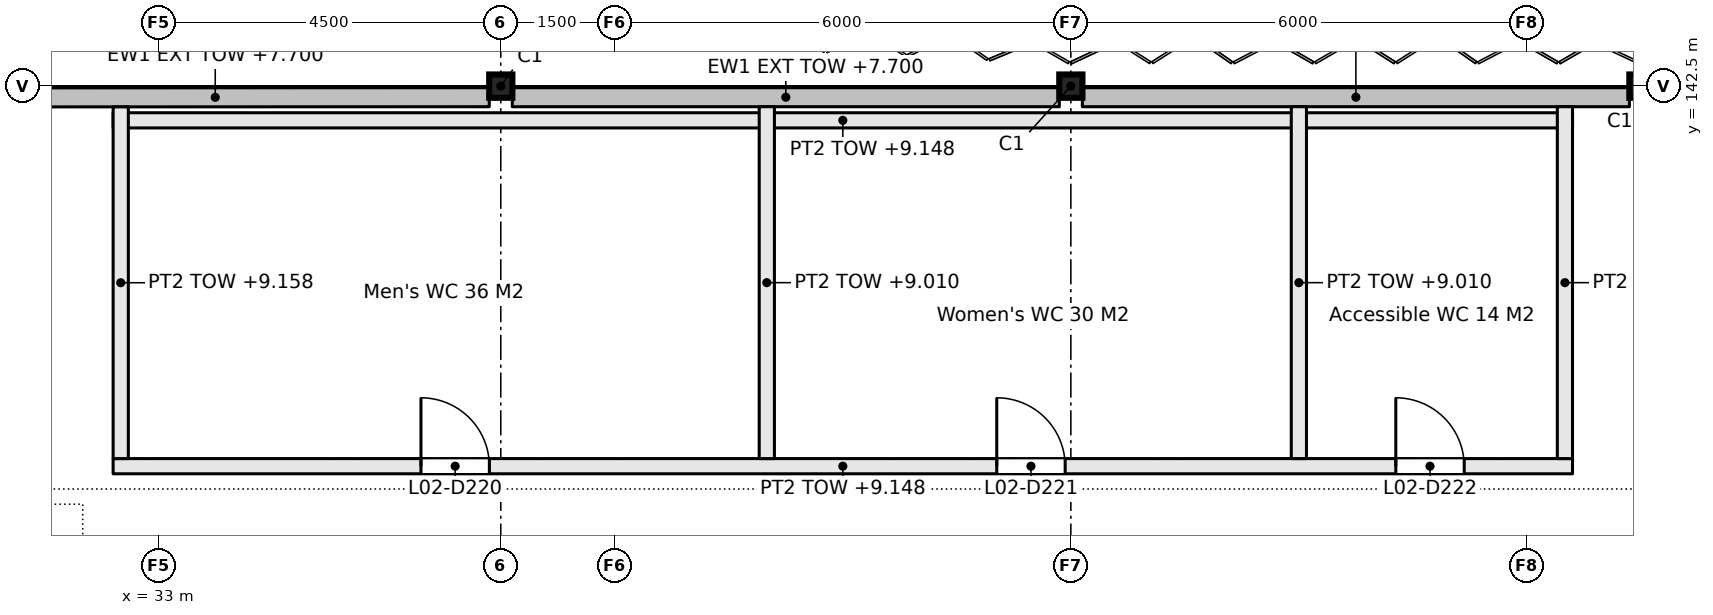
"""IFC4 building model, lengths in metres.
Left out: names, types, materials, properties, quantities, classifications, styles, units other than length and angle.
Written with IfcOpenShell. Run it as: python <this file> out.ifc"""

import sys

from ifc_helpers import new_model, si_unit, direction, frame, frame_2d, origin, origin_2d, place, context, subcontext, project, spatial, rectangle, i_section, extrude, element, fill, save


model = new_model("IFC4")
c1 = context("Model", 3, precision=1e-05, world=origin(), true_north=direction((0.0, 1.0)))
c2 = subcontext(c1, "Body", "Model", "MODEL_VIEW")
j1 = project(units=[si_unit("LENGTHUNIT", "METRE"), si_unit("PLANEANGLEUNIT", "RADIAN")], contexts=[c1])
p1 = place(None, origin())
s1 = spatial("IfcSite", under=j1, at=p1, CompositionType="ELEMENT")
p2 = place(p1, origin())
s2 = spatial("IfcBuilding", under=s1, at=p2, CompositionType="ELEMENT")
p3 = place(p2, frame((0.0, 0.0, 6.6)))
s3 = spatial("IfcBuildingStorey", under=s2, at=p3, CompositionType="ELEMENT", Elevation=6.6)
for number, where, z_axis, x_axis in (
    (1, (37.5, 142.5, 0.0), (0.0, 0.0, 1.0), (1.0, 0.0, 0.0)),
    (2, (45.0, 142.5, 0.0), (0.0, 0.0, 1.0), (1.0, 0.0, 0.0)),
    (3, (52.5, 142.5, 0.0), (0.0, 0.0, 1.0), (1.0, 0.0, 0.0)),
):
    element("IfcColumn", number, at=place(p3, frame(where, z_axis=z_axis, x_axis=x_axis)), inside=s3, PredefinedType="COLUMN", context=c2, shape_type="SweptSolid", body=[
        extrude(i_section(OverallWidth=0.305, OverallDepth=0.307, WebThickness=0.01, FlangeThickness=0.015, FilletRadius=0.015, at=origin_2d()), origin(), (0.0, 0.0, 1.0), 3.3),
    ])
p4 = place(p3, frame((32.4, 137.5, 0.0), z_axis=(0.0, 0.0, 1.0), x_axis=(1.0, 0.0, 0.0)))
e4 = element("IfcWall", 4, at=p4, inside=s3, PredefinedType="PARTITIONING", context=c2, shape_type="SweptSolid", body=[
    extrude(rectangle(XDim=19.2, YDim=0.2, at=frame_2d((9.6, 0.0))), origin(), (0.0, 0.0, 1.0), 2.548),
])
p5 = place(p4, frame((4.05, 0.0, 0.0)))
e5 = element("IfcOpeningElement", 5, at=p5, cuts=e4, PredefinedType="OPENING", context=c2, shape_type="SweptSolid", body=[
    extrude(rectangle(XDim=0.9, YDim=2.1, at=frame_2d((0.45, 1.05))), frame((0.0, 0.11, 0.0), z_axis=(0.0, -1.0, 0.0), x_axis=(1.0, 0.0, 0.0)), (0.0, 0.0, 1.0), 0.22),
])
p6 = place(p4, frame((11.625, 0.0, 0.0)))
e6 = element("IfcOpeningElement", 6, at=p6, cuts=e4, PredefinedType="OPENING", context=c2, shape_type="SweptSolid", body=[
    extrude(rectangle(XDim=0.9, YDim=2.1, at=frame_2d((0.45, 1.05))), frame((0.0, 0.11, 0.0), z_axis=(0.0, -1.0, 0.0), x_axis=(1.0, 0.0, 0.0)), (0.0, 0.0, 1.0), 0.22),
])
p7 = place(p4, frame((16.875, 0.0, 0.0)))
e7 = element("IfcOpeningElement", 7, at=p7, cuts=e4, PredefinedType="OPENING", context=c2, shape_type="SweptSolid", body=[
    extrude(rectangle(XDim=0.9, YDim=2.1, at=frame_2d((0.45, 1.05))), frame((0.0, 0.11, 0.0), z_axis=(0.0, -1.0, 0.0), x_axis=(1.0, 0.0, 0.0)), (0.0, 0.0, 1.0), 0.22),
])
p8 = place(p3, frame((32.4, 142.05, 0.0), z_axis=(0.0, 0.0, 1.0), x_axis=(1.0, 0.0, 0.0)))
e8 = element("IfcWall", 8, at=p8, inside=s3, PredefinedType="PARTITIONING", context=c2, shape_type="SweptSolid", body=[
    extrude(rectangle(XDim=19.2, YDim=0.2, at=frame_2d((9.6, 0.0))), origin(), (0.0, 0.0, 1.0), 2.548),
])
p9 = place(p3, frame((32.5, 137.6, 0.0), z_axis=(0.0, 0.0, 1.0), x_axis=(0.0, 1.0, 0.0)))
e9 = element("IfcWall", 9, at=p9, inside=s3, PredefinedType="PARTITIONING", context=c2, shape_type="SweptSolid", body=[
    extrude(rectangle(XDim=4.627, YDim=0.2, at=frame_2d((2.313, 0.0))), origin(), (0.0, 0.0, 1.0), 2.558),
])
for number, where, z_axis, x_axis in (
    (10, (41.0, 137.6, 0.0), (0.0, 0.0, 1.0), (0.0, 1.0, 0.0)),
    (11, (48.0, 137.6, 0.0), (0.0, 0.0, 1.0), (0.0, 1.0, 0.0)),
    (12, (51.5, 137.6, 0.0), (0.0, 0.0, 1.0), (0.0, 1.0, 0.0)),
):
    element("IfcWall", number, at=place(p3, frame(where, z_axis=z_axis, x_axis=x_axis)), inside=s3, PredefinedType="PARTITIONING", context=c2, shape_type="SweptSolid", body=[
        extrude(rectangle(XDim=4.629, YDim=0.2, at=frame_2d((2.314, 0.0))), origin(), (0.0, 0.0, 1.0), 2.41),
    ])
for number, where, z_axis, x_axis in (
    (13, (52.348, 142.354, 0.0), (0.0, 0.0, 1.0), (-1.0, 0.0, 0.0)),
    (14, (44.848, 142.354, 0.0), (0.0, 0.0, 1.0), (-1.0, 0.0, 0.0)),
):
    element("IfcWall", number, at=place(p3, frame(where, z_axis=z_axis, x_axis=x_axis)), inside=s3, PredefinedType="SOLIDWALL", context=c2, shape_type="SweptSolid", body=[
        extrude(rectangle(XDim=7.197, YDim=0.25, at=frame_2d((3.598, 0.0))), origin(), (0.0, 0.0, 1.0), 1.1),
    ])
p10 = place(p3, frame((37.348, 142.354, 0.0), z_axis=(0.0, 0.0, 1.0), x_axis=(-0.999999917439, -0.000406352613, 0.0)))
e15 = element("IfcWall", 15, at=p10, inside=s3, PredefinedType="SOLIDWALL", context=c2, shape_type="SweptSolid", body=[
    extrude(rectangle(XDim=7.21, YDim=0.25, at=frame_2d((3.605, 0.0))), origin(), (0.0, 0.0, 1.0), 1.1),
])
p11 = place(p5, origin())
e16 = element("IfcDoor", 16, at=p11, inside=s3, OperationType="SINGLE_SWING_LEFT", PredefinedType="DOOR", context=c2, shape_type="SweptSolid", body=[
    extrude(rectangle(XDim=0.9, YDim=2.1, at=frame_2d((0.45, 1.05))), frame((0.0, 0.025, 0.0), z_axis=(0.0, -1.0, 0.0), x_axis=(1.0, 0.0, 0.0)), (0.0, 0.0, 1.0), 0.05),
])
fill(e5, e16)
p12 = place(p6, origin())
e17 = element("IfcDoor", 17, at=p12, inside=s3, OperationType="SINGLE_SWING_RIGHT", PredefinedType="DOOR", context=c2, shape_type="SweptSolid", body=[
    extrude(rectangle(XDim=0.9, YDim=2.1, at=frame_2d((0.45, 1.05))), frame((0.0, 0.025, 0.0), z_axis=(0.0, -1.0, 0.0), x_axis=(1.0, 0.0, 0.0)), (0.0, 0.0, 1.0), 0.05),
])
fill(e6, e17)
p13 = place(p7, origin())
e18 = element("IfcDoor", 18, at=p13, inside=s3, OperationType="SINGLE_SWING_RIGHT", PredefinedType="DOOR", context=c2, shape_type="SweptSolid", body=[
    extrude(rectangle(XDim=0.9, YDim=2.1, at=frame_2d((0.45, 1.05))), frame((0.0, 0.025, 0.0), z_axis=(0.0, -1.0, 0.0), x_axis=(1.0, 0.0, 0.0)), (0.0, 0.0, 1.0), 0.05),
])
fill(e7, e18)
save(model, sys.argv[1])
